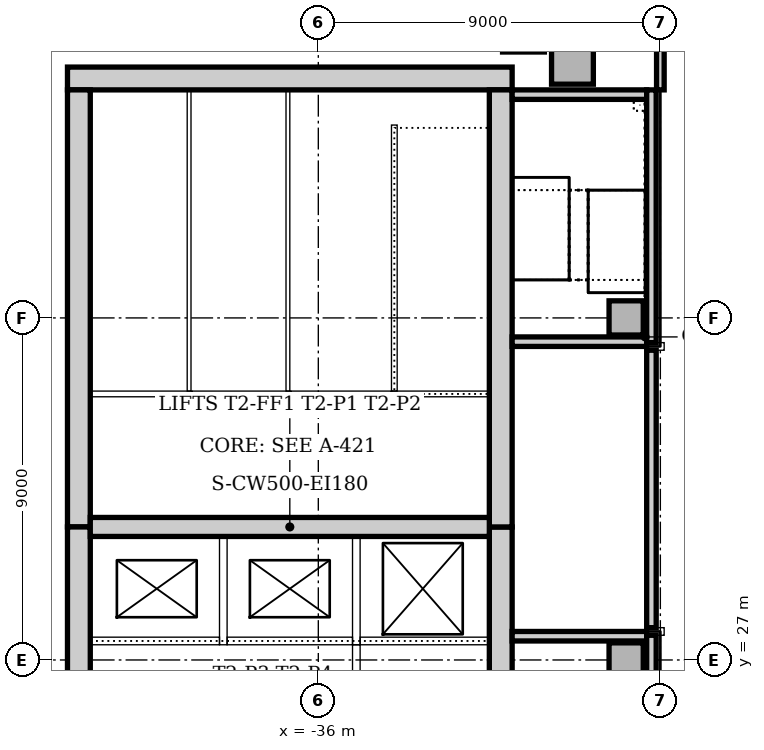
"""IFC4 building model, lengths in metres.
Left out: names, types, materials, properties, quantities, classifications, styles, units other than length and angle.
Written with IfcOpenShell. Run it as: python <this file> out.ifc"""

import sys

from ifc_helpers import new_model, si_unit, direction, frame, frame_2d, origin, origin_2d, place, context, subcontext, project, spatial, rectangle, extrude, element, fill, save


model = new_model("IFC4")
c1 = context("Model", 3, precision=1e-05, world=origin(), true_north=direction((0.0, 1.0)))
c2 = subcontext(c1, "Body", "Model", "MODEL_VIEW")
j1 = project(units=[si_unit("LENGTHUNIT", "METRE"), si_unit("PLANEANGLEUNIT", "RADIAN")], contexts=[c1])
p1 = place(None, origin())
s1 = spatial("IfcSite", under=j1, at=p1, CompositionType="ELEMENT")
p2 = place(p1, origin())
s2 = spatial("IfcBuilding", under=s1, at=p2, CompositionType="ELEMENT")
p3 = place(p2, frame((0.0, 0.0, 6.0)))
s3 = spatial("IfcBuildingStorey", under=s2, at=p3, CompositionType="ELEMENT", Elevation=6.0)
p4 = place(p3, frame((-30.9, 42.3, 0.0), z_axis=(0.0, 0.0, 1.0), x_axis=(-1.0, 0.0, 0.0)))
e1 = element("IfcWall", 1, at=p4, inside=s3, PredefinedType="SOLIDWALL", context=c2, shape_type="SweptSolid", body=[
    extrude(rectangle(XDim=11.7, YDim=0.6, at=frame_2d((5.85, 0.0))), origin(), (0.0, 0.0, 1.0), 5.0),
])
p5 = place(p3, frame((-31.2, 21.0, 0.0), z_axis=(0.0, 0.0, 1.0), x_axis=(0.0, 1.0, 0.0)))
e2 = element("IfcWall", 2, at=p5, inside=s3, PredefinedType="SOLIDWALL", context=c2, shape_type="SweptSolid", body=[
    extrude(rectangle(XDim=9.5, YDim=0.6, at=frame_2d((4.75, 0.0))), origin(), (0.0, 0.0, 1.0), 5.0),
])
p6 = place(p5, frame((5.25, 0.0, 0.0)))
e3 = element("IfcOpeningElement", 3, at=p6, cuts=e2, PredefinedType="OPENING", context=c2, shape_type="SweptSolid", body=[
    extrude(rectangle(XDim=1.0, YDim=2.1, at=frame_2d((0.5, 1.05))), frame((0.0, 0.31, 0.0), z_axis=(0.0, -1.0, 0.0), x_axis=(1.0, 0.0, 0.0)), (0.0, 0.0, 1.0), 0.62),
])
p7 = place(p3, frame((-31.2, 30.5, 0.0), z_axis=(0.0, 0.0, 1.0), x_axis=(0.0, 1.0, 0.0)))
e4 = element("IfcWall", 4, at=p7, inside=s3, PredefinedType="SOLIDWALL", context=c2, shape_type="SweptSolid", body=[
    extrude(rectangle(XDim=11.5, YDim=0.6, at=frame_2d((5.75, 0.0))), origin(), (0.0, 0.0, 1.0), 5.0),
])
p8 = place(p7, frame((0.85, 0.0, 0.0)))
e5 = element("IfcOpeningElement", 5, at=p8, cuts=e4, PredefinedType="OPENING", context=c2, shape_type="SweptSolid", body=[
    extrude(rectangle(XDim=1.8, YDim=2.1, at=frame_2d((0.9, 1.05))), frame((0.0, 0.31, 0.0), z_axis=(0.0, -1.0, 0.0), x_axis=(1.0, 0.0, 0.0)), (0.0, 0.0, 1.0), 0.62),
])
p9 = place(p3, frame((-42.3, 42.0, 0.0), z_axis=(0.0, 0.0, 1.0), x_axis=(0.0, -1.0, 0.0)))
e6 = element("IfcWall", 6, at=p9, inside=s3, PredefinedType="SOLIDWALL", context=c2, shape_type="SweptSolid", body=[
    extrude(rectangle(XDim=11.5, YDim=0.6, at=frame_2d((5.75, 0.0))), origin(), (0.0, 0.0, 1.0), 5.0),
])
p10 = place(p9, frame((8.85, 0.0, 0.0)))
e7 = element("IfcOpeningElement", 7, at=p10, cuts=e6, PredefinedType="OPENING", context=c2, shape_type="SweptSolid", body=[
    extrude(rectangle(XDim=1.8, YDim=2.1, at=frame_2d((0.9, 1.05))), frame((0.0, 0.31, 0.0), z_axis=(0.0, -1.0, 0.0), x_axis=(1.0, 0.0, 0.0)), (0.0, 0.0, 1.0), 0.62),
])
p11 = place(p3, frame((-42.3, 30.5, 0.0), z_axis=(0.0, 0.0, 1.0), x_axis=(0.0, -1.0, 0.0)))
e8 = element("IfcWall", 8, at=p11, inside=s3, PredefinedType="SOLIDWALL", context=c2, shape_type="SweptSolid", body=[
    extrude(rectangle(XDim=9.5, YDim=0.6, at=frame_2d((4.75, 0.0))), origin(), (0.0, 0.0, 1.0), 5.0),
])
p12 = place(p11, frame((3.85, 0.0, 0.0)))
e9 = element("IfcOpeningElement", 9, at=p12, cuts=e8, PredefinedType="OPENING", context=c2, shape_type="SweptSolid", body=[
    extrude(rectangle(XDim=1.8, YDim=2.1, at=frame_2d((0.9, 1.05))), frame((0.0, 0.31, 0.0), z_axis=(0.0, -1.0, 0.0), x_axis=(1.0, 0.0, 0.0)), (0.0, 0.0, 1.0), 0.62),
])
p13 = place(p3, frame((-42.0, 30.5, 0.0), z_axis=(0.0, 0.0, 1.0), x_axis=(1.0, 0.0, 0.0)))
e10 = element("IfcWall", 10, at=p13, inside=s3, PredefinedType="SOLIDWALL", context=c2, shape_type="SweptSolid", body=[
    extrude(rectangle(XDim=10.5, YDim=0.5, at=frame_2d((5.25, 0.0))), origin(), (0.0, 0.0, 1.0), 5.0),
])
p14 = place(p3, frame((-27.36, 27.625, 0.0), z_axis=(0.0, 0.0, 1.0), x_axis=(-1.0, 0.0, 0.0)))
e11 = element("IfcWall", 11, at=p14, inside=s3, PredefinedType="SOLIDWALL", context=c2, shape_type="SweptSolid", body=[
    extrude(rectangle(XDim=3.54, YDim=0.25, at=frame_2d((1.77, 0.0))), origin(), (0.0, 0.0, 1.0), 5.0),
])
p15 = place(p14, frame((1.69, 0.0, 0.0)))
e12 = element("IfcOpeningElement", 12, at=p15, cuts=e11, PredefinedType="OPENING", context=c2, shape_type="SweptSolid", body=[
    extrude(rectangle(XDim=1.1, YDim=2.1, at=frame_2d((0.55, 1.05))), frame((0.0, 0.135, 0.0), z_axis=(0.0, -1.0, 0.0), x_axis=(1.0, 0.0, 0.0)), (0.0, 0.0, 1.0), 0.27),
])
p16 = place(p3, frame((-30.9, 35.375, 0.0), z_axis=(0.0, 0.0, 1.0), x_axis=(1.0, 0.0, 0.0)))
e13 = element("IfcWall", 13, at=p16, inside=s3, PredefinedType="SOLIDWALL", context=c2, shape_type="SweptSolid", body=[
    extrude(rectangle(XDim=3.54, YDim=0.25, at=frame_2d((1.77, 0.0))), origin(), (0.0, 0.0, 1.0), 5.0),
])
p17 = place(p16, frame((0.75, 0.0, 0.0)))
e14 = element("IfcOpeningElement", 14, at=p17, cuts=e13, PredefinedType="OPENING", context=c2, shape_type="SweptSolid", body=[
    extrude(rectangle(XDim=1.1, YDim=2.1, at=frame_2d((0.55, 1.05))), frame((0.0, 0.135, 0.0), z_axis=(0.0, -1.0, 0.0), x_axis=(1.0, 0.0, 0.0)), (0.0, 0.0, 1.0), 0.27),
])
p18 = place(p3, frame((-27.36, 41.875, 0.0), z_axis=(0.0, 0.0, 1.0), x_axis=(-1.0, 0.0, 0.0)))
e15 = element("IfcWall", 15, at=p18, inside=s3, PredefinedType="SOLIDWALL", context=c2, shape_type="SweptSolid", body=[
    extrude(rectangle(XDim=3.54, YDim=0.25, at=frame_2d((1.77, 0.0))), origin(), (0.0, 0.0, 1.0), 5.0),
])
p19 = place(p3, frame((-27.235, 21.0, 0.0), z_axis=(0.0, 0.0, 1.0), x_axis=(0.0, 1.0, 0.0)))
e16 = element("IfcWall", 16, at=p19, inside=s3, PredefinedType="SOLIDWALL", context=c2, shape_type="SweptSolid", body=[
    extrude(rectangle(XDim=6.65, YDim=0.25, at=frame_2d((3.325, 0.0))), origin(), (0.0, 0.0, 1.0), 5.0),
])
p20 = place(p3, frame((-27.235, 27.85, 0.0), z_axis=(0.0, 0.0, 1.0), x_axis=(0.0, 1.0, 0.0)))
e17 = element("IfcWall", 17, at=p20, inside=s3, PredefinedType="SOLIDWALL", context=c2, shape_type="SweptSolid", body=[
    extrude(rectangle(XDim=7.3, YDim=0.25, at=frame_2d((3.65, 0.0))), origin(), (0.0, 0.0, 1.0), 5.0),
])
p21 = place(p3, frame((-27.235, 35.35, 0.0), z_axis=(0.0, 0.0, 1.0), x_axis=(0.0, 1.0, 0.0)))
e18 = element("IfcWall", 18, at=p21, inside=s3, PredefinedType="SOLIDWALL", context=c2, shape_type="SweptSolid", body=[
    extrude(rectangle(XDim=6.65, YDim=0.25, at=frame_2d((3.325, 0.0))), origin(), (0.0, 0.0, 1.0), 5.0),
])
for number, where, z_axis, x_axis in (
    (19, (-29.313, 42.7, 0.0), (0.0, 0.0, 1.0), (1.0, 0.0, 0.0)),
    (20, (-30.602, 43.547, 0.0), (0.0, 0.0, 1.0), (1.0, 0.0, 0.0)),
):
    element("IfcColumn", number, at=place(p3, frame(where, z_axis=z_axis, x_axis=x_axis)), inside=s3, PredefinedType="COLUMN", context=c2, shape_type="SweptSolid", body=[
        extrude(rectangle(XDim=1.1, YDim=1.1, at=origin_2d()), origin(), (0.0, 0.0, 1.0), 4.7),
    ])
for number, where, z_axis, x_axis in (
    (21, (-27.9, 27.0, 0.0), (0.0, 0.0, 1.0), (1.0, 0.0, 0.0)),
    (22, (-27.9, 36.0, 0.0), (0.0, 0.0, 1.0), (1.0, 0.0, 0.0)),
):
    element("IfcColumn", number, at=place(p3, frame(where, z_axis=z_axis, x_axis=x_axis)), inside=s3, PredefinedType="COLUMN", context=c2, shape_type="SweptSolid", body=[
        extrude(rectangle(XDim=0.9, YDim=0.9, at=origin_2d()), origin(), (0.0, 0.0, 1.0), 5.0),
    ])
p22 = place(p3, frame((-27.0, 42.0, 0.0), z_axis=(0.0, 0.0, 1.0), x_axis=(0.0, 1.0, 0.0)))
e23 = element("IfcWall", 23, at=p22, inside=s3, PredefinedType="PARTITIONING", context=c2, shape_type="SweptSolid", body=[
    extrude(rectangle(XDim=3.0, YDim=0.2, at=frame_2d((1.5, 0.0))), origin(), (0.0, 0.0, 1.0), 4.7),
])
p23 = place(p3, frame((-38.5, 27.4, 0.0), z_axis=(0.0, 0.0, 1.0), x_axis=(0.0, 1.0, 0.0)))
e24 = element("IfcWall", 24, at=p23, inside=s3, PredefinedType="SOLIDWALL", context=c2, shape_type="SweptSolid", body=[
    extrude(rectangle(XDim=2.85, YDim=0.2, at=frame_2d((1.425, 0.0))), origin(), (0.0, 0.0, 1.0), 5.0),
])
p24 = place(p3, frame((-42.0, 27.5, 0.0), z_axis=(0.0, 0.0, 1.0), x_axis=(1.0, 0.0, 0.0)))
e25 = element("IfcWall", 25, at=p24, inside=s3, PredefinedType="SOLIDWALL", context=c2, shape_type="SweptSolid", body=[
    extrude(rectangle(XDim=3.4, YDim=0.2, at=frame_2d((1.7, 0.0))), origin(), (0.0, 0.0, 1.0), 5.0),
])
p25 = place(p24, frame((1.5, 0.0, 0.0)))
e26 = element("IfcOpeningElement", 26, at=p25, cuts=e25, PredefinedType="OPENING", context=c2, shape_type="SweptSolid", body=[
    extrude(rectangle(XDim=1.1, YDim=2.1, at=frame_2d((0.55, 1.05))), frame((0.0, 0.11, 0.0), z_axis=(0.0, -1.0, 0.0), x_axis=(1.0, 0.0, 0.0)), (0.0, 0.0, 1.0), 0.22),
])
p26 = place(p3, frame((-35.0, 27.4, 0.0), z_axis=(0.0, 0.0, 1.0), x_axis=(0.0, 1.0, 0.0)))
e27 = element("IfcWall", 27, at=p26, inside=s3, PredefinedType="SOLIDWALL", context=c2, shape_type="SweptSolid", body=[
    extrude(rectangle(XDim=2.85, YDim=0.2, at=frame_2d((1.425, 0.0))), origin(), (0.0, 0.0, 1.0), 5.0),
])
p27 = place(p3, frame((-38.4, 27.5, 0.0), z_axis=(0.0, 0.0, 1.0), x_axis=(1.0, 0.0, 0.0)))
e28 = element("IfcWall", 28, at=p27, inside=s3, PredefinedType="SOLIDWALL", context=c2, shape_type="SweptSolid", body=[
    extrude(rectangle(XDim=3.3, YDim=0.2, at=frame_2d((1.65, 0.0))), origin(), (0.0, 0.0, 1.0), 5.0),
])
p28 = place(p27, frame((1.1, 0.0, 0.0)))
e29 = element("IfcOpeningElement", 29, at=p28, cuts=e28, PredefinedType="OPENING", context=c2, shape_type="SweptSolid", body=[
    extrude(rectangle(XDim=1.1, YDim=2.1, at=frame_2d((0.55, 1.05))), frame((0.0, 0.11, 0.0), z_axis=(0.0, -1.0, 0.0), x_axis=(1.0, 0.0, 0.0)), (0.0, 0.0, 1.0), 0.22),
])
p29 = place(p3, frame((-34.9, 27.5, 0.0), z_axis=(0.0, 0.0, 1.0), x_axis=(1.0, 0.0, 0.0)))
e30 = element("IfcWall", 30, at=p29, inside=s3, PredefinedType="SOLIDWALL", context=c2, shape_type="SweptSolid", body=[
    extrude(rectangle(XDim=3.4, YDim=0.2, at=frame_2d((1.7, 0.0))), origin(), (0.0, 0.0, 1.0), 5.0),
])
p30 = place(p29, frame((1.1, 0.0, 0.0)))
e31 = element("IfcOpeningElement", 31, at=p30, cuts=e30, PredefinedType="OPENING", context=c2, shape_type="SweptSolid", body=[
    extrude(rectangle(XDim=1.1, YDim=2.1, at=frame_2d((0.55, 1.05))), frame((0.0, 0.11, 0.0), z_axis=(0.0, -1.0, 0.0), x_axis=(1.0, 0.0, 0.0)), (0.0, 0.0, 1.0), 0.22),
])
p31 = place(p3, frame((-35.0, 24.1, 0.0), z_axis=(0.0, 0.0, 1.0), x_axis=(0.0, 1.0, 0.0)))
e32 = element("IfcWall", 32, at=p31, inside=s3, PredefinedType="SOLIDWALL", context=c2, shape_type="SweptSolid", body=[
    extrude(rectangle(XDim=3.3, YDim=0.2, at=frame_2d((1.65, 0.0))), origin(), (0.0, 0.0, 1.0), 5.0),
])
p32 = place(p31, frame((1.15, 0.0, 0.0)))
e33 = element("IfcOpeningElement", 33, at=p32, cuts=e32, PredefinedType="OPENING", context=c2, shape_type="SweptSolid", body=[
    extrude(rectangle(XDim=1.0, YDim=2.1, at=frame_2d((0.5, 1.05))), frame((0.0, 0.11, 0.0), z_axis=(0.0, -1.0, 0.0), x_axis=(1.0, 0.0, 0.0)), (0.0, 0.0, 1.0), 0.22),
])
for number, where, z_axis, x_axis in (
    (34, (-27.36, 27.75, 0.0), (0.0, 0.0, 1.0), (1.0, 0.0, 0.0)),
    (35, (-26.9, 35.25, 0.0), (0.0, 0.0, 1.0), (-1.0, 0.0, 0.0)),
):
    element("IfcWall", number, at=place(p3, frame(where, z_axis=z_axis, x_axis=x_axis)), inside=s3, PredefinedType="SOLIDWALL", context=c2, shape_type="SweptSolid", body=[
        extrude(rectangle(XDim=0.46, YDim=0.2, at=frame_2d((0.23, 0.0))), origin(), (0.0, 0.0, 1.0), 5.0),
    ])
p33 = place(p3, frame((-34.075, 34.0, 0.0), z_axis=(0.0, 0.0, 1.0), x_axis=(1.0, 0.0, 0.0)))
e36 = element("IfcWall", 36, at=p33, inside=s3, PredefinedType="SOLIDWALL", context=c2, shape_type="SweptSolid", body=[
    extrude(rectangle(XDim=2.575, YDim=0.15, at=frame_2d((1.288, 0.0))), origin(), (0.0, 0.0, 1.0), 5.0),
])
p34 = place(p3, frame((-34.0, 41.075, 0.0), z_axis=(0.0, 0.0, 1.0), x_axis=(0.0, -1.0, 0.0)))
e37 = element("IfcWall", 37, at=p34, inside=s3, PredefinedType="SOLIDWALL", context=c2, shape_type="SweptSolid", body=[
    extrude(rectangle(XDim=7.0, YDim=0.15, at=frame_2d((3.5, 0.0))), origin(), (0.0, 0.0, 1.0), 5.0),
])
p35 = place(p3, frame((-39.325, 34.0, 0.0), z_axis=(0.0, 0.0, 1.0), x_axis=(-1.0, 0.0, 0.0)))
e38 = element("IfcWall", 38, at=p35, inside=s3, PredefinedType="PARTITIONING", context=c2, shape_type="SweptSolid", body=[
    extrude(rectangle(XDim=2.675, YDim=0.15, at=frame_2d((1.337, 0.0))), origin(), (0.0, 0.0, 1.0), 4.7),
])
p36 = place(p35, frame((0.975, 0.0, 0.0)))
e39 = element("IfcOpeningElement", 39, at=p36, cuts=e38, PredefinedType="OPENING", context=c2, shape_type="SweptSolid", body=[
    extrude(rectangle(XDim=0.8, YDim=2.1, at=frame_2d((0.4, 1.05))), frame((0.0, 0.085, 0.0), z_axis=(0.0, -1.0, 0.0), x_axis=(1.0, 0.0, 0.0)), (0.0, 0.0, 1.0), 0.17),
])
p37 = place(p3, frame((-36.725, 34.0, 0.0), z_axis=(0.0, 0.0, 1.0), x_axis=(-1.0, 0.0, 0.0)))
e40 = element("IfcWall", 40, at=p37, inside=s3, PredefinedType="PARTITIONING", context=c2, shape_type="SweptSolid", body=[
    extrude(rectangle(XDim=2.6, YDim=0.15, at=frame_2d((1.3, 0.0))), origin(), (0.0, 0.0, 1.0), 4.7),
])
p38 = place(p37, frame((0.975, 0.0, 0.0)))
e41 = element("IfcOpeningElement", 41, at=p38, cuts=e40, PredefinedType="OPENING", context=c2, shape_type="SweptSolid", body=[
    extrude(rectangle(XDim=0.8, YDim=2.1, at=frame_2d((0.4, 1.05))), frame((0.0, 0.085, 0.0), z_axis=(0.0, -1.0, 0.0), x_axis=(1.0, 0.0, 0.0)), (0.0, 0.0, 1.0), 0.17),
])
p39 = place(p3, frame((-34.075, 34.0, 0.0), z_axis=(0.0, 0.0, 1.0), x_axis=(-1.0, 0.0, 0.0)))
e42 = element("IfcWall", 42, at=p39, inside=s3, PredefinedType="PARTITIONING", context=c2, shape_type="SweptSolid", body=[
    extrude(rectangle(XDim=2.65, YDim=0.15, at=frame_2d((1.325, 0.0))), origin(), (0.0, 0.0, 1.0), 4.7),
])
p40 = place(p39, frame((0.925, 0.0, 0.0)))
e43 = element("IfcOpeningElement", 43, at=p40, cuts=e42, PredefinedType="OPENING", context=c2, shape_type="SweptSolid", body=[
    extrude(rectangle(XDim=0.8, YDim=2.1, at=frame_2d((0.4, 1.05))), frame((0.0, 0.085, 0.0), z_axis=(0.0, -1.0, 0.0), x_axis=(1.0, 0.0, 0.0)), (0.0, 0.0, 1.0), 0.17),
])
for number, where, z_axis, x_axis in (
    (44, (-39.4, 34.075, 0.0), (0.0, 0.0, 1.0), (0.0, 1.0, 0.0)),
    (45, (-36.8, 34.075, 0.0), (0.0, 0.0, 1.0), (0.0, 1.0, 0.0)),
):
    element("IfcWall", number, at=place(p3, frame(where, z_axis=z_axis, x_axis=x_axis)), inside=s3, PredefinedType="PARTITIONING", context=c2, shape_type="SweptSolid", body=[
        extrude(rectangle(XDim=7.925, YDim=0.1, at=frame_2d((3.962, 0.0))), origin(), (0.0, 0.0, 1.0), 4.7),
    ])
p41 = place(p25, origin())
e46 = element("IfcDoor", 46, at=p41, inside=s3, OperationType="SLIDING_TO_LEFT", PredefinedType="DOOR", context=c2, shape_type="SweptSolid", body=[
    extrude(rectangle(XDim=1.1, YDim=2.1, at=frame_2d((0.55, 1.05))), frame((0.0, 0.025, 0.0), z_axis=(0.0, -1.0, 0.0), x_axis=(1.0, 0.0, 0.0)), (0.0, 0.0, 1.0), 0.05),
])
fill(e26, e46)
p42 = place(p28, origin())
e47 = element("IfcDoor", 47, at=p42, inside=s3, OperationType="SLIDING_TO_LEFT", PredefinedType="DOOR", context=c2, shape_type="SweptSolid", body=[
    extrude(rectangle(XDim=1.1, YDim=2.1, at=frame_2d((0.55, 1.05))), frame((0.0, 0.025, 0.0), z_axis=(0.0, -1.0, 0.0), x_axis=(1.0, 0.0, 0.0)), (0.0, 0.0, 1.0), 0.05),
])
fill(e29, e47)
p43 = place(p30, origin())
e48 = element("IfcDoor", 48, at=p43, inside=s3, OperationType="SLIDING_TO_LEFT", PredefinedType="DOOR", context=c2, shape_type="SweptSolid", body=[
    extrude(rectangle(XDim=1.1, YDim=2.1, at=frame_2d((0.55, 1.05))), frame((0.0, 0.025, 0.0), z_axis=(0.0, -1.0, 0.0), x_axis=(1.0, 0.0, 0.0)), (0.0, 0.0, 1.0), 0.05),
])
fill(e31, e48)
p44 = place(p6, frame((1.0, 0.0, 0.0), z_axis=(0.0, 0.0, 1.0), x_axis=(-1.0, 0.0, 0.0)))
e49 = element("IfcDoor", 49, at=p44, inside=s3, OperationType="SINGLE_SWING_LEFT", PredefinedType="DOOR", context=c2, shape_type="SweptSolid", body=[
    extrude(rectangle(XDim=1.0, YDim=2.1, at=frame_2d((0.5, 1.05))), frame((0.0, 0.025, 0.0), z_axis=(0.0, -1.0, 0.0), x_axis=(1.0, 0.0, 0.0)), (0.0, 0.0, 1.0), 0.05),
])
fill(e3, e49)
p45 = place(p15, origin())
e50 = element("IfcDoor", 50, at=p45, inside=s3, OperationType="SINGLE_SWING_RIGHT", PredefinedType="DOOR", context=c2, shape_type="SweptSolid", body=[
    extrude(rectangle(XDim=1.1, YDim=2.1, at=frame_2d((0.55, 1.05))), frame((0.0, 0.025, 0.0), z_axis=(0.0, -1.0, 0.0), x_axis=(1.0, 0.0, 0.0)), (0.0, 0.0, 1.0), 0.05),
])
fill(e12, e50)
p46 = place(p17, origin())
e51 = element("IfcDoor", 51, at=p46, inside=s3, OperationType="SINGLE_SWING_RIGHT", PredefinedType="DOOR", context=c2, shape_type="SweptSolid", body=[
    extrude(rectangle(XDim=1.1, YDim=2.1, at=frame_2d((0.55, 1.05))), frame((0.0, 0.025, 0.0), z_axis=(0.0, -1.0, 0.0), x_axis=(1.0, 0.0, 0.0)), (0.0, 0.0, 1.0), 0.05),
])
fill(e14, e51)
p47 = place(p8, origin())
e52 = element("IfcDoor", 52, at=p47, inside=s3, OperationType="DOUBLE_DOOR_SINGLE_SWING", PredefinedType="DOOR", context=c2, shape_type="SweptSolid", body=[
    extrude(rectangle(XDim=1.8, YDim=2.1, at=frame_2d((0.9, 1.05))), frame((0.0, 0.025, 0.0), z_axis=(0.0, -1.0, 0.0), x_axis=(1.0, 0.0, 0.0)), (0.0, 0.0, 1.0), 0.05),
])
fill(e5, e52)
p48 = place(p10, frame((1.8, 0.0, 0.0), z_axis=(0.0, 0.0, 1.0), x_axis=(-1.0, 0.0, 0.0)))
e53 = element("IfcDoor", 53, at=p48, inside=s3, OperationType="DOUBLE_DOOR_SINGLE_SWING", PredefinedType="DOOR", context=c2, shape_type="SweptSolid", body=[
    extrude(rectangle(XDim=1.8, YDim=2.1, at=frame_2d((0.9, 1.05))), frame((0.0, 0.025, 0.0), z_axis=(0.0, -1.0, 0.0), x_axis=(1.0, 0.0, 0.0)), (0.0, 0.0, 1.0), 0.05),
])
fill(e7, e53)
p49 = place(p36, frame((0.8, 0.0, 0.0), z_axis=(0.0, 0.0, 1.0), x_axis=(-1.0, 0.0, 0.0)))
e54 = element("IfcDoor", 54, at=p49, inside=s3, OperationType="SINGLE_SWING_LEFT", PredefinedType="DOOR", context=c2, shape_type="SweptSolid", body=[
    extrude(rectangle(XDim=0.8, YDim=2.1, at=frame_2d((0.4, 1.05))), frame((0.0, 0.025, 0.0), z_axis=(0.0, -1.0, 0.0), x_axis=(1.0, 0.0, 0.0)), (0.0, 0.0, 1.0), 0.05),
])
fill(e39, e54)
p50 = place(p38, frame((0.8, 0.0, 0.0), z_axis=(0.0, 0.0, 1.0), x_axis=(-1.0, 0.0, 0.0)))
e55 = element("IfcDoor", 55, at=p50, inside=s3, OperationType="SINGLE_SWING_RIGHT", PredefinedType="DOOR", context=c2, shape_type="SweptSolid", body=[
    extrude(rectangle(XDim=0.8, YDim=2.1, at=frame_2d((0.4, 1.05))), frame((0.0, 0.025, 0.0), z_axis=(0.0, -1.0, 0.0), x_axis=(1.0, 0.0, 0.0)), (0.0, 0.0, 1.0), 0.05),
])
fill(e41, e55)
p51 = place(p40, frame((0.8, 0.0, 0.0), z_axis=(0.0, 0.0, 1.0), x_axis=(-1.0, 0.0, 0.0)))
e56 = element("IfcDoor", 56, at=p51, inside=s3, OperationType="SINGLE_SWING_LEFT", PredefinedType="DOOR", context=c2, shape_type="SweptSolid", body=[
    extrude(rectangle(XDim=0.8, YDim=2.1, at=frame_2d((0.4, 1.05))), frame((0.0, 0.025, 0.0), z_axis=(0.0, -1.0, 0.0), x_axis=(1.0, 0.0, 0.0)), (0.0, 0.0, 1.0), 0.05),
])
fill(e43, e56)
save(model, sys.argv[1])
